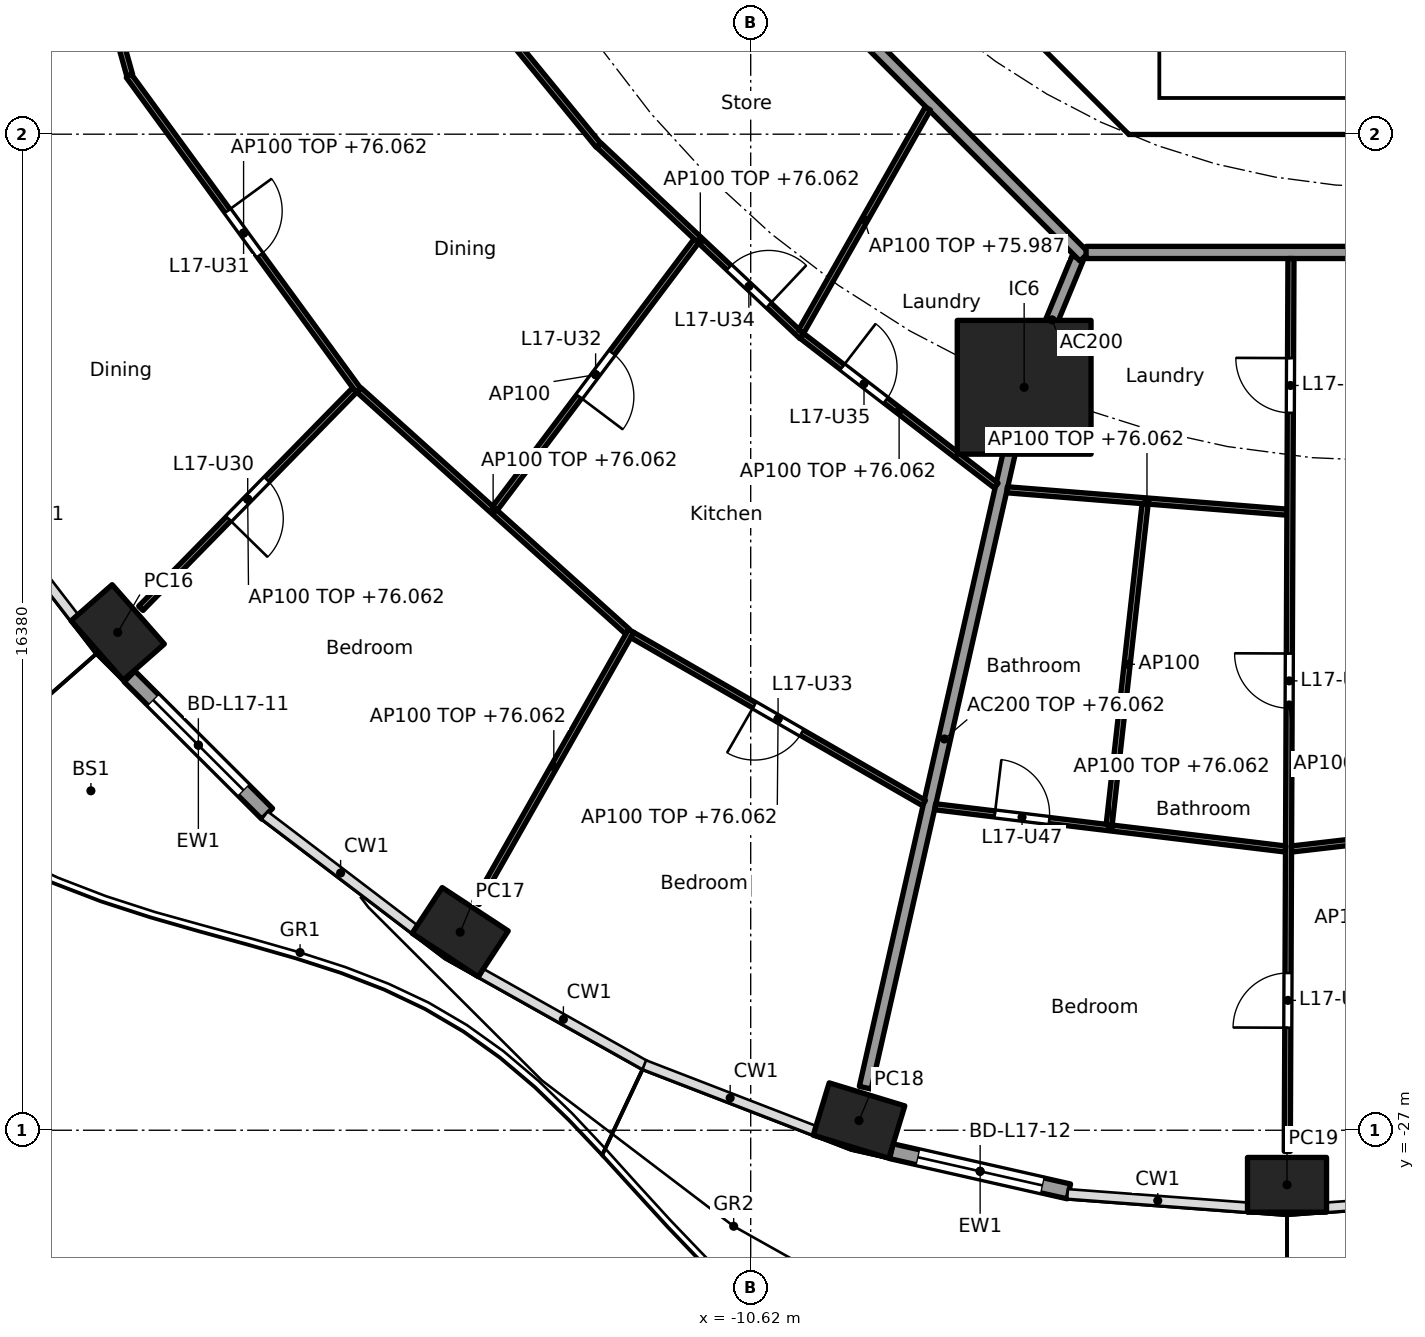
"""IFC4 building model, lengths in metres.
Left out: names, types, materials, properties, quantities, classifications, styles, units other than length and angle.
Written with IfcOpenShell. Run it as: python <this file> out.ifc"""

import sys

from ifc_helpers import new_model, si_unit, direction, frame, frame_2d, origin, origin_2d, place, context, subcontext, project, spatial, polyline, rectangle, hollow_rectangle, outline, extrude, element, fill, save


model = new_model("IFC4")
c1 = context("Model", 3, precision=1e-05, world=origin(), true_north=direction((0.0, 1.0)))
c2 = subcontext(c1, "Body", "Model", "MODEL_VIEW")
j1 = project(units=[si_unit("LENGTHUNIT", "METRE"), si_unit("PLANEANGLEUNIT", "RADIAN")], contexts=[c1])
p1 = place(None, origin())
s1 = spatial("IfcSite", under=j1, at=p1, CompositionType="ELEMENT")
p2 = place(p1, origin())
s2 = spatial("IfcBuilding", under=s1, at=p2, CompositionType="ELEMENT")
p3 = place(p2, frame((0.0, 0.0, 73.3)))
s3 = spatial("IfcBuildingStorey", under=s2, at=p3, CompositionType="ELEMENT", Elevation=73.3)
for number, where, z_axis, x_axis in (
    (1, (-21.03, -18.813, -0.26), (0.0, 0.0, 1.0), (0.66, -0.751, 0.0)),
    (2, (-15.397, -23.742, -0.26), (0.0, 0.0, 1.0), (0.836, -0.549, 0.0)),
    (3, (-8.839, -26.841, -0.26), (0.0, 0.0, 1.0), (0.957, -0.292, 0.0)),
    (4, (-1.8, -27.897, -0.26), (0.0, 0.0, 1.0), (1.0, 0.0, 0.0)),
):
    element("IfcColumn", number, at=place(p3, frame(where, z_axis=z_axis, x_axis=x_axis)), inside=s3, PredefinedType="COLUMN", context=c2, shape_type="SweptSolid", body=[
        extrude(hollow_rectangle(XDim=1.3, YDim=0.9, WallThickness=0.045, at=origin_2d()), origin(), (0.0, 0.0, 1.0), 3.96),
    ])
p4 = place(p3, frame((-6.123, -14.782, 0.0), z_axis=(0.0, 0.0, 1.0), x_axis=(1.0, 0.0, 0.0)))
e5 = element("IfcColumn", 5, at=p4, inside=s3, PredefinedType="COLUMN", context=c2, shape_type="SweptSolid", body=[
    extrude(rectangle(XDim=2.2, YDim=2.2, at=origin_2d()), origin(), (0.0, 0.0, 1.0), 3.7),
])
p5 = place(p3, frame((-18.571, -21.796, 0.0), z_axis=(0.0, 0.0, 1.0), x_axis=(-0.707831646613, 0.706381171927, 0.0)))
e6 = element("IfcWall", 6, at=p5, inside=s3, PredefinedType="SOLIDWALL", context=c2, shape_type="SweptSolid", body=[
    extrude(rectangle(XDim=3.198, YDim=0.25, at=frame_2d((1.599, 0.0))), origin(), (0.0, 0.0, 1.0), 3.44),
])
p6 = place(p5, frame((0.549, 0.0, 0.0)))
e7 = element("IfcOpeningElement", 7, at=p6, cuts=e6, PredefinedType="OPENING", context=c2, shape_type="SweptSolid", body=[
    extrude(rectangle(XDim=2.1, YDim=2.4, at=frame_2d((1.05, 1.2))), frame((0.0, 0.135, 0.0), z_axis=(0.0, -1.0, 0.0), x_axis=(1.0, 0.0, 0.0)), (0.0, 0.0, 1.0), 0.27),
])
p7 = place(p3, frame((-5.387, -28.006, 0.0), z_axis=(0.0, 0.0, 1.0), x_axis=(-0.975317607872, 0.220806620767, 0.0)))
e8 = element("IfcWall", 8, at=p7, inside=s3, PredefinedType="SOLIDWALL", context=c2, shape_type="SweptSolid", body=[
    extrude(rectangle(XDim=2.993, YDim=0.25, at=frame_2d((1.497, 0.0))), origin(), (0.0, 0.0, 1.0), 3.44),
])
p8 = place(p7, frame((0.447, 0.0, 0.0)))
e9 = element("IfcOpeningElement", 9, at=p8, cuts=e8, PredefinedType="OPENING", context=c2, shape_type="SweptSolid", body=[
    extrude(rectangle(XDim=2.1, YDim=2.4, at=frame_2d((1.05, 1.2))), frame((0.0, 0.135, 0.0), z_axis=(0.0, -1.0, 0.0), x_axis=(1.0, 0.0, 0.0)), (0.0, 0.0, 1.0), 0.27),
])
p9 = place(p3, frame((-9.988, -4.613, 0.0), z_axis=(0.0, 0.0, 1.0), x_axis=(0.707106781187, -0.707106781187, 0.0)))
e10 = element("IfcWall", 10, at=p9, inside=s3, PredefinedType="SHEAR", context=c2, shape_type="SweptSolid", body=[
    extrude(rectangle(XDim=7.602, YDim=0.6, at=frame_2d((3.801, 0.0))), origin(), (0.0, 0.0, 1.0), 3.44),
])
p10 = place(p9, frame((6.151, 0.0, 0.0)))
e11 = element("IfcOpeningElement", 11, at=p10, cuts=e10, PredefinedType="OPENING", context=c2, shape_type="SweptSolid", body=[
    extrude(rectangle(XDim=1.1, YDim=2.1, at=frame_2d((0.55, 1.05))), frame((0.0, 0.31, 0.0), z_axis=(0.0, -1.0, 0.0), x_axis=(1.0, 0.0, 0.0)), (0.0, 0.0, 1.0), 0.62),
])
p11 = place(p3, origin())
e12 = element("IfcWall", 12, at=p11, inside=s3, PredefinedType="SHEAR", context=c2, shape_type="SweptSolid", body=[
    extrude(outline(polyline([(-4.152, -10.025), (4.152, -10.025), (4.401, -9.776), (4.825, -10.2), (4.401, -10.625), (-4.401, -10.625), (-4.825, -10.2), (-4.401, -9.776), (-4.152, -10.025)])), origin(), (0.0, 0.0, 1.0), 3.44),
])
p12 = place(p3, origin())
e13 = element("IfcWall", 13, at=p12, inside=s3, PredefinedType="SOLIDWALL", context=c2, shape_type="SweptSolid", body=[
    extrude(outline(polyline([(-3.9, -10.025), (-4.1, -10.025), (-4.1, -7.025), (-3.9, -7.025), (-3.9, -10.025)])), origin(), (0.0, 0.0, 1.0), 3.44),
])
p13 = place(p3, frame((-5.243, -12.657, 0.0), z_axis=(0.0, 0.0, 1.0), x_axis=(-0.382668627144, -0.923885664896, 0.0)))
e14 = element("IfcWall", 14, at=p13, inside=s3, PredefinedType="PARTITIONING", context=c2, shape_type="SweptSolid", body=[
    extrude(rectangle(XDim=2.2, YDim=0.2, at=frame_2d((1.1, 0.0))), origin(), (0.0, 0.0, 1.0), 3.44),
])
p14 = place(p3, frame((-6.134, -14.831, 0.0), z_axis=(0.0, 0.0, 1.0), x_axis=(-0.221225405869, -0.975222702667, 0.0)))
e15 = element("IfcWall", 15, at=p14, inside=s3, PredefinedType="PARTITIONING", context=c2, shape_type="SweptSolid", body=[
    extrude(rectangle(XDim=11.761, YDim=0.2, at=frame_2d((5.88, 0.0))), origin(), (0.0, 0.0, 1.0), 2.762),
])
p15 = place(p3, frame((-12.635, -5.134, 0.0), z_axis=(0.0, 0.0, 1.0), x_axis=(0.707106781187, -0.707106781187, 0.0)))
e16 = element("IfcWall", 16, at=p15, inside=s3, PredefinedType="PARTITIONING", context=c2, shape_type="SweptSolid", body=[
    extrude(rectangle(XDim=10.609, YDim=0.2, at=frame_2d((5.305, 0.0))), origin(), (0.0, 0.0, 1.0), 3.44),
])
p16 = place(p3, frame((-5.104, -12.565, 0.0), z_axis=(0.0, 0.0, 1.0), x_axis=(1.0, 0.0, 0.0)))
e17 = element("IfcWall", 17, at=p16, inside=s3, PredefinedType="PARTITIONING", context=c2, shape_type="SweptSolid", body=[
    extrude(rectangle(XDim=10.409, YDim=0.2, at=frame_2d((5.205, 0.0))), origin(), (0.0, 0.0, 1.0), 3.44),
])
p17 = place(p16, frame((4.604, 0.0, 0.0)))
e18 = element("IfcOpeningElement", 18, at=p17, cuts=e17, PredefinedType="OPENING", context=c2, shape_type="SweptSolid", body=[
    extrude(rectangle(XDim=1.0, YDim=2.1, at=frame_2d((0.5, 1.05))), frame((0.0, 0.11, 0.0), z_axis=(0.0, -1.0, 0.0), x_axis=(1.0, 0.0, 0.0)), (0.0, 0.0, 1.0), 0.22),
])
p18 = place(p3, frame((-22.463, -3.832, 0.0), z_axis=(0.0, 0.0, 1.0), x_axis=(0.269797759333, -0.962917010473, 0.0)))
e19 = element("IfcWall", 19, at=p18, inside=s3, PredefinedType="PARTITIONING", context=c2, shape_type="SweptSolid", body=[
    extrude(rectangle(XDim=6.043, YDim=0.1, at=frame_2d((3.021, 0.0))), origin(), (0.0, 0.0, 1.0), 2.762),
])
p19 = place(p3, frame((-16.277, -6.951, 0.0), z_axis=(0.0, 0.0, 1.0), x_axis=(0.633427340372, -0.773802173988, 0.0)))
e20 = element("IfcWall", 20, at=p19, inside=s3, PredefinedType="PARTITIONING", context=c2, shape_type="SweptSolid", body=[
    extrude(rectangle(XDim=4.979, YDim=0.1, at=frame_2d((2.49, 0.0))), origin(), (0.0, 0.0, 1.0), 2.762),
])
p20 = place(p3, frame((-20.848, -9.658, 0.0), z_axis=(0.0, 0.0, 1.0), x_axis=(0.5895799361, -0.807710033953, 0.0)))
e21 = element("IfcWall", 21, at=p20, inside=s3, PredefinedType="PARTITIONING", context=c2, shape_type="SweptSolid", body=[
    extrude(rectangle(XDim=6.408, YDim=0.1, at=frame_2d((3.204, 0.0))), origin(), (0.0, 0.0, 1.0), 2.762),
])
p21 = place(p20, frame((2.754, 0.0, 0.0)))
e22 = element("IfcOpeningElement", 22, at=p21, cuts=e21, PredefinedType="OPENING", context=c2, shape_type="SweptSolid", body=[
    extrude(rectangle(XDim=0.9, YDim=2.1, at=frame_2d((0.45, 1.05))), frame((0.0, 0.06, 0.0), z_axis=(0.0, -1.0, 0.0), x_axis=(1.0, 0.0, 0.0)), (0.0, 0.0, 1.0), 0.12),
])
p22 = place(p3, frame((-13.118, -10.8, 0.0), z_axis=(0.0, 0.0, 1.0), x_axis=(0.72818280142, -0.685382964273, 0.0)))
e23 = element("IfcWall", 23, at=p22, inside=s3, PredefinedType="PARTITIONING", context=c2, shape_type="SweptSolid", body=[
    extrude(rectangle(XDim=4.586, YDim=0.1, at=frame_2d((2.293, 0.0))), origin(), (0.0, 0.0, 1.0), 2.762),
])
p23 = place(p22, frame((2.94, 0.0, 0.0)))
e24 = element("IfcOpeningElement", 24, at=p23, cuts=e23, PredefinedType="OPENING", context=c2, shape_type="SweptSolid", body=[
    extrude(rectangle(XDim=0.9, YDim=2.1, at=frame_2d((0.45, 1.05))), frame((0.0, 0.06, 0.0), z_axis=(0.0, -1.0, 0.0), x_axis=(1.0, 0.0, 0.0)), (0.0, 0.0, 1.0), 0.12),
])
p24 = place(p3, frame((-17.135, -14.829, 0.0), z_axis=(0.0, 0.0, 1.0), x_axis=(-0.699702869429, -0.714433967917, 0.0)))
e25 = element("IfcWall", 25, at=p24, inside=s3, PredefinedType="PARTITIONING", context=c2, shape_type="SweptSolid", body=[
    extrude(rectangle(XDim=5.022, YDim=0.1, at=frame_2d((2.511, 0.0))), origin(), (0.0, 0.0, 1.0), 2.762),
])
p25 = place(p24, frame((2.061, 0.0, 0.0)))
e26 = element("IfcOpeningElement", 26, at=p25, cuts=e25, PredefinedType="OPENING", context=c2, shape_type="SweptSolid", body=[
    extrude(rectangle(XDim=0.9, YDim=2.1, at=frame_2d((0.45, 1.05))), frame((0.0, 0.06, 0.0), z_axis=(0.0, -1.0, 0.0), x_axis=(1.0, 0.0, 0.0)), (0.0, 0.0, 1.0), 0.12),
])
p26 = place(p3, frame((-17.063, -14.827, 0.0), z_axis=(0.0, 0.0, 1.0), x_axis=(0.743478142868, -0.668760234373, 0.0)))
e27 = element("IfcWall", 27, at=p26, inside=s3, PredefinedType="PARTITIONING", context=c2, shape_type="SweptSolid", body=[
    extrude(rectangle(XDim=5.937, YDim=0.1, at=frame_2d((2.969, 0.0))), origin(), (0.0, 0.0, 1.0), 2.762),
])
p27 = place(p3, frame((-11.515, -12.377, 0.0), z_axis=(0.0, 0.0, 1.0), x_axis=(-0.60163860397, -0.798768420891, 0.0)))
e28 = element("IfcWall", 28, at=p27, inside=s3, PredefinedType="PARTITIONING", context=c2, shape_type="SweptSolid", body=[
    extrude(rectangle(XDim=5.502, YDim=0.1, at=frame_2d((2.751, 0.0))), origin(), (0.0, 0.0, 1.0), 3.44),
])
p28 = place(p27, frame((2.301, 0.0, 0.0)))
e29 = element("IfcOpeningElement", 29, at=p28, cuts=e28, PredefinedType="OPENING", context=c2, shape_type="SweptSolid", body=[
    extrude(rectangle(XDim=0.9, YDim=2.1, at=frame_2d((0.45, 1.05))), frame((0.0, 0.06, 0.0), z_axis=(0.0, -1.0, 0.0), x_axis=(1.0, 0.0, 0.0)), (0.0, 0.0, 1.0), 0.12),
])
p29 = place(p3, frame((-7.707, -10.198, 0.0), z_axis=(0.0, 0.0, 1.0), x_axis=(-0.493986531217, -0.869469554945, 0.0)))
e30 = element("IfcWall", 30, at=p29, inside=s3, PredefinedType="PARTITIONING", context=c2, shape_type="SweptSolid", body=[
    extrude(rectangle(XDim=4.217, YDim=0.1, at=frame_2d((2.109, 0.0))), origin(), (0.0, 0.0, 1.0), 2.687),
])
p30 = place(p3, frame((-9.775, -13.939, 0.0), z_axis=(0.0, 0.0, 1.0), x_axis=(0.792162117554, -0.610310723741, 0.0)))
e31 = element("IfcWall", 31, at=p30, inside=s3, PredefinedType="PARTITIONING", context=c2, shape_type="SweptSolid", body=[
    extrude(rectangle(XDim=4.03, YDim=0.1, at=frame_2d((2.015, 0.0))), origin(), (0.0, 0.0, 1.0), 2.762),
])
p31 = place(p30, frame((0.836, 0.0, 0.0)))
e32 = element("IfcOpeningElement", 32, at=p31, cuts=e31, PredefinedType="OPENING", context=c2, shape_type="SweptSolid", body=[
    extrude(rectangle(XDim=0.9, YDim=2.1, at=frame_2d((0.45, 1.05))), frame((0.0, 0.06, 0.0), z_axis=(0.0, -1.0, 0.0), x_axis=(1.0, 0.0, 0.0)), (0.0, 0.0, 1.0), 0.12),
])
p32 = place(p3, frame((-12.587, -18.787, 0.0), z_axis=(0.0, 0.0, 1.0), x_axis=(-0.493966211317, -0.869481099321, 0.0)))
e33 = element("IfcWall", 33, at=p32, inside=s3, PredefinedType="PARTITIONING", context=c2, shape_type="SweptSolid", body=[
    extrude(rectangle(XDim=5.146, YDim=0.1, at=frame_2d((2.573, 0.0))), origin(), (0.0, 0.0, 1.0), 2.762),
])
p33 = place(p3, frame((-12.568, -18.856, 0.0), z_axis=(0.0, 0.0, 1.0), x_axis=(0.866533437451, -0.499119025664, 0.0)))
e34 = element("IfcWall", 34, at=p33, inside=s3, PredefinedType="PARTITIONING", context=c2, shape_type="SweptSolid", body=[
    extrude(rectangle(XDim=5.535, YDim=0.1, at=frame_2d((2.768, 0.0))), origin(), (0.0, 0.0, 1.0), 2.762),
])
p34 = place(p33, frame((2.317, 0.0, 0.0)))
e35 = element("IfcOpeningElement", 35, at=p34, cuts=e34, PredefinedType="OPENING", context=c2, shape_type="SweptSolid", body=[
    extrude(rectangle(XDim=0.9, YDim=2.1, at=frame_2d((0.45, 1.05))), frame((0.0, 0.06, 0.0), z_axis=(0.0, -1.0, 0.0), x_axis=(1.0, 0.0, 0.0)), (0.0, 0.0, 1.0), 0.12),
])
p35 = place(p3, frame((-6.404, -16.468, 0.0), z_axis=(0.0, 0.0, 1.0), x_axis=(0.996818808981, -0.079701079432, 0.0)))
e36 = element("IfcWall", 36, at=p35, inside=s3, PredefinedType="PARTITIONING", context=c2, shape_type="SweptSolid", body=[
    extrude(rectangle(XDim=4.616, YDim=0.1, at=frame_2d((2.308, 0.0))), origin(), (0.0, 0.0, 1.0), 2.762),
])
p36 = place(p3, frame((-7.586, -21.68, 0.0), z_axis=(0.0, 0.0, 1.0), x_axis=(0.992810189026, -0.119699325668, 0.0)))
e37 = element("IfcWall", 37, at=p36, inside=s3, PredefinedType="PARTITIONING", context=c2, shape_type="SweptSolid", body=[
    extrude(rectangle(XDim=5.803, YDim=0.1, at=frame_2d((2.901, 0.0))), origin(), (0.0, 0.0, 1.0), 2.762),
])
p37 = place(p36, frame((0.988, 0.0, 0.0)))
e38 = element("IfcOpeningElement", 38, at=p37, cuts=e37, PredefinedType="OPENING", context=c2, shape_type="SweptSolid", body=[
    extrude(rectangle(XDim=0.9, YDim=2.1, at=frame_2d((0.45, 1.05))), frame((0.0, 0.06, 0.0), z_axis=(0.0, -1.0, 0.0), x_axis=(1.0, 0.0, 0.0)), (0.0, 0.0, 1.0), 0.12),
])
p38 = place(p3, frame((-4.134, -16.699, 0.0), z_axis=(0.0, 0.0, 1.0), x_axis=(-0.111340048649, -0.993782367305, 0.0)))
e39 = element("IfcWall", 39, at=p38, inside=s3, PredefinedType="PARTITIONING", context=c2, shape_type="SweptSolid", body=[
    extrude(rectangle(XDim=5.309, YDim=0.1, at=frame_2d((2.654, 0.0))), origin(), (0.0, 0.0, 1.0), 3.44),
])
p39 = place(p3, frame((-1.735, -12.665, 0.0), z_axis=(0.0, 0.0, 1.0), x_axis=(-0.004107048833, -0.999991566039, 0.0)))
e40 = element("IfcWall", 40, at=p39, inside=s3, PredefinedType="PARTITIONING", context=c2, shape_type="SweptSolid", body=[
    extrude(rectangle(XDim=14.683, YDim=0.1, at=frame_2d((7.341, 0.0))), origin(), (0.0, 0.0, 1.0), 2.687),
])
p40 = place(p39, frame((1.637, 0.0, 0.0)))
e41 = element("IfcOpeningElement", 41, at=p40, cuts=e40, PredefinedType="OPENING", context=c2, shape_type="SweptSolid", body=[
    extrude(rectangle(XDim=0.9, YDim=2.1, at=frame_2d((0.45, 1.05))), frame((0.0, 0.06, 0.0), z_axis=(0.0, -1.0, 0.0), x_axis=(1.0, 0.0, 0.0)), (0.0, 0.0, 1.0), 0.12),
])
p41 = place(p39, frame((6.496, 0.0, 0.0)))
e42 = element("IfcOpeningElement", 42, at=p41, cuts=e40, PredefinedType="OPENING", context=c2, shape_type="SweptSolid", body=[
    extrude(rectangle(XDim=0.9, YDim=2.1, at=frame_2d((0.45, 1.05))), frame((0.0, 0.06, 0.0), z_axis=(0.0, -1.0, 0.0), x_axis=(1.0, 0.0, 0.0)), (0.0, 0.0, 1.0), 0.12),
])
p42 = place(p39, frame((11.75, 0.0, 0.0)))
e43 = element("IfcOpeningElement", 43, at=p42, cuts=e40, PredefinedType="OPENING", context=c2, shape_type="SweptSolid", body=[
    extrude(rectangle(XDim=0.9, YDim=2.1, at=frame_2d((0.45, 1.05))), frame((0.0, 0.06, 0.0), z_axis=(0.0, -1.0, 0.0), x_axis=(1.0, 0.0, 0.0)), (0.0, 0.0, 1.0), 0.12),
])
p43 = place(p3, frame((-1.726, -22.375, 0.0), z_axis=(0.0, 0.0, 1.0), x_axis=(0.99339223329, 0.114768771187, 0.0)))
e44 = element("IfcWall", 44, at=p43, inside=s3, PredefinedType="PARTITIONING", context=c2, shape_type="SweptSolid", body=[
    extrude(rectangle(XDim=5.701, YDim=0.1, at=frame_2d((2.851, 0.0))), origin(), (0.0, 0.0, 1.0), 2.762),
])
p44 = place(p43, frame((2.4, 0.0, 0.0)))
e45 = element("IfcOpeningElement", 45, at=p44, cuts=e44, PredefinedType="OPENING", context=c2, shape_type="SweptSolid", body=[
    extrude(rectangle(XDim=0.9, YDim=2.1, at=frame_2d((0.45, 1.05))), frame((0.0, 0.06, 0.0), z_axis=(0.0, -1.0, 0.0), x_axis=(1.0, 0.0, 0.0)), (0.0, 0.0, 1.0), 0.12),
])
p45 = place(p6, origin())
e46 = element("IfcDoor", 46, at=p45, inside=s3, OperationType="SLIDING_TO_LEFT", PredefinedType="DOOR", context=c2, shape_type="SweptSolid", body=[
    extrude(rectangle(XDim=2.1, YDim=2.4, at=frame_2d((1.05, 1.2))), frame((0.0, 0.025, 0.0), z_axis=(0.0, -1.0, 0.0), x_axis=(1.0, 0.0, 0.0)), (0.0, 0.0, 1.0), 0.05),
])
fill(e7, e46)
p46 = place(p8, origin())
e47 = element("IfcDoor", 47, at=p46, inside=s3, OperationType="SLIDING_TO_LEFT", PredefinedType="DOOR", context=c2, shape_type="SweptSolid", body=[
    extrude(rectangle(XDim=2.1, YDim=2.4, at=frame_2d((1.05, 1.2))), frame((0.0, 0.025, 0.0), z_axis=(0.0, -1.0, 0.0), x_axis=(1.0, 0.0, 0.0)), (0.0, 0.0, 1.0), 0.05),
])
fill(e9, e47)
p47 = place(p10, origin())
e48 = element("IfcDoor", 48, at=p47, inside=s3, OperationType="SINGLE_SWING_LEFT", PredefinedType="DOOR", context=c2, shape_type="SweptSolid", body=[
    extrude(rectangle(XDim=1.1, YDim=2.1, at=frame_2d((0.55, 1.05))), frame((0.0, 0.025, 0.0), z_axis=(0.0, -1.0, 0.0), x_axis=(1.0, 0.0, 0.0)), (0.0, 0.0, 1.0), 0.05),
])
fill(e11, e48)
p48 = place(p25, origin())
e49 = element("IfcDoor", 49, at=p48, inside=s3, OperationType="SINGLE_SWING_RIGHT", PredefinedType="DOOR", context=c2, shape_type="SweptSolid", body=[
    extrude(rectangle(XDim=0.9, YDim=2.1, at=frame_2d((0.45, 1.05))), frame((0.0, 0.025, 0.0), z_axis=(0.0, -1.0, 0.0), x_axis=(1.0, 0.0, 0.0)), (0.0, 0.0, 1.0), 0.05),
])
fill(e26, e49)
p49 = place(p21, origin())
e50 = element("IfcDoor", 50, at=p49, inside=s3, OperationType="SINGLE_SWING_LEFT", PredefinedType="DOOR", context=c2, shape_type="SweptSolid", body=[
    extrude(rectangle(XDim=0.9, YDim=2.1, at=frame_2d((0.45, 1.05))), frame((0.0, 0.025, 0.0), z_axis=(0.0, -1.0, 0.0), x_axis=(1.0, 0.0, 0.0)), (0.0, 0.0, 1.0), 0.05),
])
fill(e22, e50)
p50 = place(p28, origin())
e51 = element("IfcDoor", 51, at=p50, inside=s3, OperationType="SINGLE_SWING_RIGHT", PredefinedType="DOOR", context=c2, shape_type="SweptSolid", body=[
    extrude(rectangle(XDim=0.9, YDim=2.1, at=frame_2d((0.45, 1.05))), frame((0.0, 0.025, 0.0), z_axis=(0.0, -1.0, 0.0), x_axis=(1.0, 0.0, 0.0)), (0.0, 0.0, 1.0), 0.05),
])
fill(e29, e51)
p51 = place(p34, frame((0.9, 0.0, 0.0), x_axis=(-1.0, 0.0, 0.0)))
e52 = element("IfcDoor", 52, at=p51, inside=s3, OperationType="SINGLE_SWING_RIGHT", PredefinedType="DOOR", context=c2, shape_type="SweptSolid", body=[
    extrude(rectangle(XDim=0.9, YDim=2.1, at=frame_2d((0.45, 1.05))), frame((0.0, 0.025, 0.0), z_axis=(0.0, -1.0, 0.0), x_axis=(1.0, 0.0, 0.0)), (0.0, 0.0, 1.0), 0.05),
])
fill(e35, e52)
p52 = place(p23, origin())
e53 = element("IfcDoor", 53, at=p52, inside=s3, OperationType="SINGLE_SWING_RIGHT", PredefinedType="DOOR", context=c2, shape_type="SweptSolid", body=[
    extrude(rectangle(XDim=0.9, YDim=2.1, at=frame_2d((0.45, 1.05))), frame((0.0, 0.025, 0.0), z_axis=(0.0, -1.0, 0.0), x_axis=(1.0, 0.0, 0.0)), (0.0, 0.0, 1.0), 0.05),
])
fill(e24, e53)
p53 = place(p31, origin())
e54 = element("IfcDoor", 54, at=p53, inside=s3, OperationType="SINGLE_SWING_LEFT", PredefinedType="DOOR", context=c2, shape_type="SweptSolid", body=[
    extrude(rectangle(XDim=0.9, YDim=2.1, at=frame_2d((0.45, 1.05))), frame((0.0, 0.025, 0.0), z_axis=(0.0, -1.0, 0.0), x_axis=(1.0, 0.0, 0.0)), (0.0, 0.0, 1.0), 0.05),
])
fill(e32, e54)
p54 = place(p40, frame((0.9, 0.0, 0.0), x_axis=(-1.0, 0.0, 0.0)))
e55 = element("IfcDoor", 55, at=p54, inside=s3, OperationType="SINGLE_SWING_RIGHT", PredefinedType="DOOR", context=c2, shape_type="SweptSolid", body=[
    extrude(rectangle(XDim=0.9, YDim=2.1, at=frame_2d((0.45, 1.05))), frame((0.0, 0.025, 0.0), z_axis=(0.0, -1.0, 0.0), x_axis=(1.0, 0.0, 0.0)), (0.0, 0.0, 1.0), 0.05),
])
fill(e41, e55)
p55 = place(p41, frame((0.9, 0.0, 0.0), x_axis=(-1.0, 0.0, 0.0)))
e56 = element("IfcDoor", 56, at=p55, inside=s3, OperationType="SINGLE_SWING_RIGHT", PredefinedType="DOOR", context=c2, shape_type="SweptSolid", body=[
    extrude(rectangle(XDim=0.9, YDim=2.1, at=frame_2d((0.45, 1.05))), frame((0.0, 0.025, 0.0), z_axis=(0.0, -1.0, 0.0), x_axis=(1.0, 0.0, 0.0)), (0.0, 0.0, 1.0), 0.05),
])
fill(e42, e56)
p56 = place(p42, frame((0.9, 0.0, 0.0), x_axis=(-1.0, 0.0, 0.0)))
e57 = element("IfcDoor", 57, at=p56, inside=s3, OperationType="SINGLE_SWING_LEFT", PredefinedType="DOOR", context=c2, shape_type="SweptSolid", body=[
    extrude(rectangle(XDim=0.9, YDim=2.1, at=frame_2d((0.45, 1.05))), frame((0.0, 0.025, 0.0), z_axis=(0.0, -1.0, 0.0), x_axis=(1.0, 0.0, 0.0)), (0.0, 0.0, 1.0), 0.05),
])
fill(e43, e57)
p57 = place(p37, origin())
e58 = element("IfcDoor", 58, at=p57, inside=s3, OperationType="SINGLE_SWING_LEFT", PredefinedType="DOOR", context=c2, shape_type="SweptSolid", body=[
    extrude(rectangle(XDim=0.9, YDim=2.1, at=frame_2d((0.45, 1.05))), frame((0.0, 0.025, 0.0), z_axis=(0.0, -1.0, 0.0), x_axis=(1.0, 0.0, 0.0)), (0.0, 0.0, 1.0), 0.05),
])
fill(e38, e58)
save(model, sys.argv[1])
